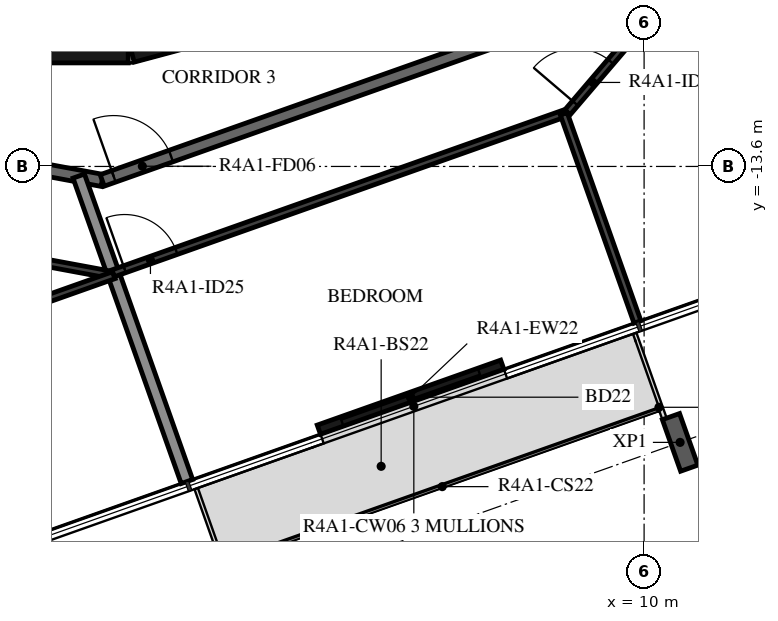
"""IFC4 building model, lengths in metres.
Left out: names, types, materials, properties, quantities, classifications, styles, units other than length and angle.
Written with IfcOpenShell. Run it as: python <this file> out.ifc"""

import sys

from ifc_helpers import new_model, si_unit, direction, frame, frame_2d, origin, origin_2d, place, context, subcontext, project, spatial, rectangle, i_section, extrude, element, fill, save


model = new_model("IFC4")
c1 = context("Model", 3, precision=1e-05, world=origin(), true_north=direction((0.0, 1.0)))
c2 = subcontext(c1, "Body", "Model", "MODEL_VIEW")
j1 = project(units=[si_unit("LENGTHUNIT", "METRE"), si_unit("PLANEANGLEUNIT", "RADIAN")], contexts=[c1])
p1 = place(None, origin())
s1 = spatial("IfcSite", under=j1, at=p1, CompositionType="ELEMENT")
p2 = place(p1, origin())
s2 = spatial("IfcBuilding", under=s1, at=p2, CompositionType="ELEMENT")
p3 = place(p2, frame((0.0, 0.0, 155.2)))
s3 = spatial("IfcBuildingStorey", under=s2, at=p3, CompositionType="ELEMENT", Elevation=155.2)
p4 = place(p3, frame((10.592, -18.138, -0.38), z_axis=(0.0, 0.0, 1.0), x_axis=(-0.942641392079, -0.333807138839, 0.0)))
e1 = element("IfcColumn", 1, at=p4, inside=s3, PredefinedType="COLUMN", context=c2, shape_type="SweptSolid", body=[
    extrude(i_section(OverallWidth=0.3, OverallDepth=0.9, WebThickness=0.019, FlangeThickness=0.035, FilletRadius=0.03, at=origin_2d()), origin(), (0.0, 0.0, 1.0), 3.5),
])
p5 = place(p3, frame((4.652, -17.929, 0.0), z_axis=(0.0, 0.0, 1.0), x_axis=(0.942620722428, 0.333865502335, 0.0)))
e2 = element("IfcWall", 2, at=p5, inside=s3, PredefinedType="STANDARD", context=c2, shape_type="SweptSolid", body=[
    extrude(rectangle(XDim=3.2, YDim=0.16, at=frame_2d((1.6, 0.0))), origin(), (0.0, 0.0, 1.0), 3.12),
])
p6 = place(p5, frame((0.4, 0.0, 0.0)))
e3 = element("IfcOpeningElement", 3, at=p6, cuts=e2, PredefinedType="OPENING", context=c2, shape_type="SweptSolid", body=[
    extrude(rectangle(XDim=2.4, YDim=2.4, at=frame_2d((1.2, 1.2))), frame((0.0, 0.09, 0.0), z_axis=(0.0, -1.0, 0.0), x_axis=(1.0, 0.0, 0.0)), (0.0, 0.0, 1.0), 0.18),
])
p7 = place(p3, frame((1.55, -11.643, 0.0), z_axis=(0.0, 0.0, 1.0), x_axis=(0.965948410781, 0.258734743916, 0.0)))
e4 = element("IfcWall", 4, at=p7, inside=s3, PredefinedType="SHEAR", context=c2, shape_type="SweptSolid", body=[
    extrude(rectangle(XDim=3.033, YDim=0.5, at=frame_2d((1.516, 0.0))), origin(), (0.0, 0.0, 1.0), 3.12),
])
p8 = place(p3, frame((-1.516, -11.647, 0.0), z_axis=(0.0, 0.0, 1.0), x_axis=(1.0, 0.0, 0.0)))
e5 = element("IfcWall", 5, at=p8, inside=s3, PredefinedType="SHEAR", context=c2, shape_type="SweptSolid", body=[
    extrude(rectangle(XDim=3.033, YDim=0.5, at=frame_2d((1.516, 0.0))), origin(), (0.0, 0.0, 1.0), 3.12),
])
p9 = place(p8, frame((0.016, 0.0, 0.0)))
e6 = element("IfcOpeningElement", 6, at=p9, cuts=e5, PredefinedType="OPENING", context=c2, shape_type="SweptSolid", body=[
    extrude(rectangle(XDim=1.2, YDim=2.1, at=frame_2d((0.6, 1.05))), frame((0.0, 0.26, 0.0), z_axis=(0.0, -1.0, 0.0), x_axis=(1.0, 0.0, 0.0)), (0.0, 0.0, 1.0), 0.52),
])
p10 = place(p3, frame((-5.972, -12.521, 0.0), z_axis=(0.0, 0.0, 1.0), x_axis=(0.983256068163, -0.18222926335, 0.0)))
e7 = element("IfcWall", 7, at=p10, inside=s3, PredefinedType="STANDARD", context=c2, shape_type="SweptSolid", body=[
    extrude(rectangle(XDim=7.181, YDim=0.2, at=frame_2d((3.59, 0.0))), origin(), (0.0, 0.0, 1.0), 3.12),
])
p11 = place(p10, frame((4.7, 0.0, 0.0)))
e8 = element("IfcOpeningElement", 8, at=p11, cuts=e7, PredefinedType="OPENING", context=c2, shape_type="SweptSolid", body=[
    extrude(rectangle(XDim=1.0, YDim=2.1, at=frame_2d((0.5, 1.05))), frame((0.0, 0.11, 0.0), z_axis=(0.0, -1.0, 0.0), x_axis=(1.0, 0.0, 0.0)), (0.0, 0.0, 1.0), 0.22),
])
p12 = place(p3, frame((1.088, -13.83, 0.0), z_axis=(0.0, 0.0, 1.0), x_axis=(0.942648397945, 0.333787354241, 0.0)))
e9 = element("IfcWall", 9, at=p12, inside=s3, PredefinedType="STANDARD", context=c2, shape_type="SweptSolid", body=[
    extrude(rectangle(XDim=7.181, YDim=0.2, at=frame_2d((3.591, 0.0))), origin(), (0.0, 0.0, 1.0), 3.12),
])
p13 = place(p12, frame((0.2, 0.0, 0.0)))
e10 = element("IfcOpeningElement", 10, at=p13, cuts=e9, PredefinedType="OPENING", context=c2, shape_type="SweptSolid", body=[
    extrude(rectangle(XDim=1.0, YDim=2.1, at=frame_2d((0.5, 1.05))), frame((0.0, 0.11, 0.0), z_axis=(0.0, -1.0, 0.0), x_axis=(1.0, 0.0, 0.0)), (0.0, 0.0, 1.0), 0.22),
])
p14 = place(p3, frame((2.482, -18.782, 0.0), z_axis=(0.0, 0.0, 1.0), x_axis=(-0.333807281402, 0.942641341594, 0.0)))
e11 = element("IfcWall", 11, at=p14, inside=s3, PredefinedType="STANDARD", context=c2, shape_type="SweptSolid", body=[
    extrude(rectangle(XDim=5.329, YDim=0.2, at=frame_2d((2.665, 0.0))), origin(), (0.0, 0.0, 1.0), 2.73),
])
p15 = place(p3, frame((-6.641, -13.923, 0.0), z_axis=(0.0, 0.0, 1.0), x_axis=(0.983250157272, -0.182261153912, 0.0)))
e12 = element("IfcWall", 12, at=p15, inside=s3, PredefinedType="PARTITIONING", context=c2, shape_type="SweptSolid", body=[
    extrude(rectangle(XDim=7.985, YDim=0.12, at=frame_2d((3.992, 0.0))), origin(), (0.0, 0.0, 1.0), 3.12),
])
p16 = place(p15, frame((1.612, 0.0, 0.0)))
e13 = element("IfcOpeningElement", 13, at=p16, cuts=e12, PredefinedType="OPENING", context=c2, shape_type="SweptSolid", body=[
    extrude(rectangle(XDim=0.8, YDim=2.1, at=frame_2d((0.4, 1.05))), frame((0.0, 0.07, 0.0), z_axis=(0.0, -1.0, 0.0), x_axis=(1.0, 0.0, 0.0)), (0.0, 0.0, 1.0), 0.14),
])
p17 = place(p3, frame((-4.17, -17.318, 0.0), z_axis=(0.0, 0.0, 1.0), x_axis=(0.942641343532, 0.333807275931, 0.0)))
e14 = element("IfcWall", 14, at=p17, inside=s3, PredefinedType="PARTITIONING", context=c2, shape_type="SweptSolid", body=[
    extrude(rectangle(XDim=5.781, YDim=0.12, at=frame_2d((2.891, 0.0))), origin(), (0.0, 0.0, 1.0), 3.12),
])
p18 = place(p3, frame((1.269, -15.357, 0.0), z_axis=(0.0, 0.0, 1.0), x_axis=(0.942639442898, 0.333812643101, 0.0)))
e15 = element("IfcWall", 15, at=p18, inside=s3, PredefinedType="PARTITIONING", context=c2, shape_type="SweptSolid", body=[
    extrude(rectangle(XDim=7.86, YDim=0.12, at=frame_2d((3.93, 0.0))), origin(), (0.0, 0.0, 1.0), 3.12),
])
p19 = place(p18, frame((0.2, 0.0, 0.0)))
e16 = element("IfcOpeningElement", 16, at=p19, cuts=e15, PredefinedType="OPENING", context=c2, shape_type="SweptSolid", body=[
    extrude(rectangle(XDim=0.9, YDim=2.1, at=frame_2d((0.45, 1.05))), frame((0.0, 0.07, 0.0), z_axis=(0.0, -1.0, 0.0), x_axis=(1.0, 0.0, 0.0)), (0.0, 0.0, 1.0), 0.14),
])
p20 = place(p3, frame((8.737, -12.713, 0.0), z_axis=(0.0, 0.0, 1.0), x_axis=(0.649430604754, 0.760420863476, 0.0)))
e17 = element("IfcWall", 17, at=p20, inside=s3, PredefinedType="PARTITIONING", context=c2, shape_type="SweptSolid", body=[
    extrude(rectangle(XDim=7.985, YDim=0.12, at=frame_2d((3.992, 0.0))), origin(), (0.0, 0.0, 1.0), 3.12),
])
p21 = place(p20, frame((0.2, 0.0, 0.0)))
e18 = element("IfcOpeningElement", 18, at=p21, cuts=e17, PredefinedType="OPENING", context=c2, shape_type="SweptSolid", body=[
    extrude(rectangle(XDim=0.9, YDim=2.1, at=frame_2d((0.45, 1.05))), frame((0.0, 0.07, 0.0), z_axis=(0.0, -1.0, 0.0), x_axis=(1.0, 0.0, 0.0)), (0.0, 0.0, 1.0), 0.14),
])
p22 = place(p20, frame((6.234, 0.0, 0.0)))
e19 = element("IfcOpeningElement", 19, at=p22, cuts=e17, PredefinedType="OPENING", context=c2, shape_type="SweptSolid", body=[
    extrude(rectangle(XDim=0.8, YDim=2.1, at=frame_2d((0.4, 1.05))), frame((0.0, 0.07, 0.0), z_axis=(0.0, -1.0, 0.0), x_axis=(1.0, 0.0, 0.0)), (0.0, 0.0, 1.0), 0.14),
])
p23 = place(p3, frame((9.891, -16.158, 0.0), z_axis=(0.0, 0.0, 1.0), x_axis=(-0.33385336213, 0.942625022262, 0.0)))
e20 = element("IfcWall", 20, at=p23, inside=s3, PredefinedType="PARTITIONING", context=c2, shape_type="SweptSolid", body=[
    extrude(rectangle(XDim=3.633, YDim=0.12, at=frame_2d((1.816, 0.0))), origin(), (0.0, 0.0, 1.0), 2.73),
])
p24 = place(p6, origin())
e21 = element("IfcDoor", 21, at=p24, inside=s3, OperationType="DOUBLE_DOOR_SLIDING", PredefinedType="DOOR", context=c2, shape_type="SweptSolid", body=[
    extrude(rectangle(XDim=2.4, YDim=2.4, at=frame_2d((1.2, 1.2))), frame((0.0, 0.025, 0.0), z_axis=(0.0, -1.0, 0.0), x_axis=(1.0, 0.0, 0.0)), (0.0, 0.0, 1.0), 0.05),
])
fill(e3, e21)
p25 = place(p13, origin())
e22 = element("IfcDoor", 22, at=p25, inside=s3, OperationType="SINGLE_SWING_LEFT", PredefinedType="DOOR", context=c2, shape_type="SweptSolid", body=[
    extrude(rectangle(XDim=1.0, YDim=2.1, at=frame_2d((0.5, 1.05))), frame((0.0, 0.025, 0.0), z_axis=(0.0, -1.0, 0.0), x_axis=(1.0, 0.0, 0.0)), (0.0, 0.0, 1.0), 0.05),
])
fill(e10, e22)
p26 = place(p19, origin())
e23 = element("IfcDoor", 23, at=p26, inside=s3, OperationType="SINGLE_SWING_LEFT", PredefinedType="DOOR", context=c2, shape_type="SweptSolid", body=[
    extrude(rectangle(XDim=0.9, YDim=2.1, at=frame_2d((0.45, 1.05))), frame((0.0, 0.025, 0.0), z_axis=(0.0, -1.0, 0.0), x_axis=(1.0, 0.0, 0.0)), (0.0, 0.0, 1.0), 0.05),
])
fill(e16, e23)
p27 = place(p21, origin())
e24 = element("IfcDoor", 24, at=p27, inside=s3, OperationType="SINGLE_SWING_RIGHT", PredefinedType="DOOR", context=c2, shape_type="SweptSolid", body=[
    extrude(rectangle(XDim=0.9, YDim=2.1, at=frame_2d((0.45, 1.05))), frame((0.0, 0.025, 0.0), z_axis=(0.0, -1.0, 0.0), x_axis=(1.0, 0.0, 0.0)), (0.0, 0.0, 1.0), 0.05),
])
fill(e18, e24)
save(model, sys.argv[1])
